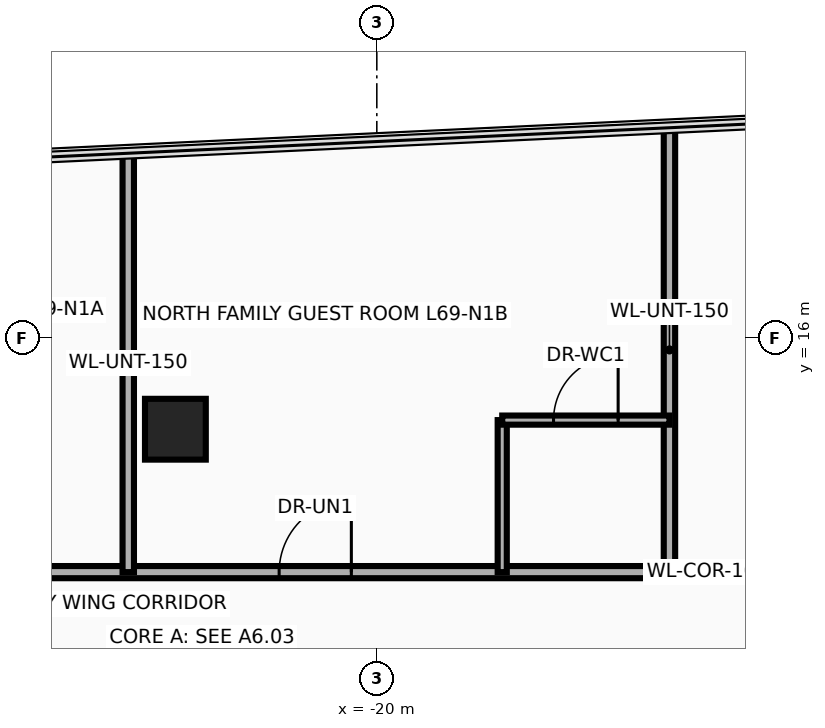
"""IFC4 building model, lengths in metres.
Left out: names, types, materials, properties, quantities, classifications, styles, units other than length and angle.
Written with IfcOpenShell. Run it as: python <this file> out.ifc"""

import sys

from ifc_helpers import new_model, si_unit, direction, frame, frame_2d, origin, origin_2d, place, context, subcontext, project, spatial, rectangle, extrude, source, transform, mapped, element, fill, save


model = new_model("IFC4")
c1 = context("Model", 3, precision=1e-05, world=origin(), true_north=direction((0.0, 1.0)))
c2 = subcontext(c1, "Body", "Model", "MODEL_VIEW")
j1 = project(units=[si_unit("LENGTHUNIT", "METRE"), si_unit("PLANEANGLEUNIT", "RADIAN")], contexts=[c1])
p1 = place(None, origin())
s1 = spatial("IfcSite", under=j1, at=p1, CompositionType="ELEMENT")
p2 = place(p1, origin())
s2 = spatial("IfcBuilding", under=s1, at=p2, CompositionType="ELEMENT")
p3 = place(p2, frame((0.0, 0.0, 266.0)))
s3 = spatial("IfcBuildingStorey", under=s2, at=p3, CompositionType="ELEMENT", Elevation=266.0)
m1 = source(origin(), c2, "Body", "SweptSolid", [
    extrude(rectangle(XDim=0.8, YDim=0.8, at=origin_2d()), origin(), (0.0, 0.0, 1.0), 3.5),
])
p4 = place(p3, frame((-22.65, 14.8, 0.0), z_axis=(0.0, 0.0, 1.0), x_axis=(1.0, 0.0, 0.0)))
e1 = element("IfcColumn", 1, at=p4, inside=s3, PredefinedType="COLUMN", context=c2, shape_type="MappedRepresentation", body=[
    mapped(m1, transform((0.0, 0.0, 0.0), x_axis=(1.0, 0.0, 0.0), y_axis=(0.0, 1.0, 0.0), z_axis=(0.0, 0.0, 1.0), scale=1.0)),
])
p5 = place(p3, frame((-30.39, 12.92, 0.0), z_axis=(0.0, 0.0, 1.0), x_axis=(1.0, 0.0, 0.0)))
e2 = element("IfcWall", 2, at=p5, inside=s3, PredefinedType="PARTITIONING", context=c2, shape_type="SweptSolid", body=[
    extrude(rectangle(XDim=29.48, YDim=0.16, at=frame_2d((14.74, 0.0))), origin(), (0.0, 0.0, 1.0), 2.634),
])
p6 = place(p5, frame((3.085, 0.0, 0.0)))
e3 = element("IfcOpeningElement", 3, at=p6, cuts=e2, PredefinedType="OPENING", context=c2, shape_type="SweptSolid", body=[
    extrude(rectangle(XDim=0.95, YDim=2.15, at=frame_2d((0.475, 1.075))), frame((0.0, 0.095, 0.0), z_axis=(0.0, -1.0, 0.0), x_axis=(1.0, 0.0, 0.0)), (0.0, 0.0, 1.0), 0.19),
])
p7 = place(p5, frame((9.105, 0.0, 0.0)))
e4 = element("IfcOpeningElement", 4, at=p7, cuts=e2, PredefinedType="OPENING", context=c2, shape_type="SweptSolid", body=[
    extrude(rectangle(XDim=0.95, YDim=2.15, at=frame_2d((0.475, 1.075))), frame((0.0, 0.095, 0.0), z_axis=(0.0, -1.0, 0.0), x_axis=(1.0, 0.0, 0.0)), (0.0, 0.0, 1.0), 0.19),
])
p8 = place(p5, frame((17.27, 0.0, 0.0)))
e5 = element("IfcOpeningElement", 5, at=p8, cuts=e2, PredefinedType="OPENING", context=c2, shape_type="SweptSolid", body=[
    extrude(rectangle(XDim=0.95, YDim=2.15, at=frame_2d((0.475, 1.075))), frame((0.0, 0.095, 0.0), z_axis=(0.0, -1.0, 0.0), x_axis=(1.0, 0.0, 0.0)), (0.0, 0.0, 1.0), 0.19),
])
p9 = place(p3, frame((-16.15, 12.92, 0.0), z_axis=(0.0, 0.0, 1.0), x_axis=(0.0, 1.0, 0.0)))
e6 = element("IfcWall", 6, at=p9, inside=s3, PredefinedType="PARTITIONING", context=c2, shape_type="SweptSolid", body=[
    extrude(rectangle(XDim=5.846, YDim=0.15, at=frame_2d((2.923, 0.0))), origin(), (0.0, 0.0, 1.0), 2.623),
])
p10 = place(p3, frame((-23.27, 12.92, 0.0), z_axis=(0.0, 0.0, 1.0), x_axis=(0.0, 1.0, 0.0)))
e7 = element("IfcWall", 7, at=p10, inside=s3, PredefinedType="PARTITIONING", context=c2, shape_type="SweptSolid", body=[
    extrude(rectangle(XDim=5.511, YDim=0.15, at=frame_2d((2.755, 0.0))), origin(), (0.0, 0.0, 1.0), 2.623),
])
p11 = place(p3, frame((-18.35, 12.92, 0.0), z_axis=(0.0, 0.0, 1.0), x_axis=(0.0, 1.0, 0.0)))
e8 = element("IfcWall", 8, at=p11, inside=s3, PredefinedType="PARTITIONING", context=c2, shape_type="SweptSolid", body=[
    extrude(rectangle(XDim=2.0, YDim=0.12, at=frame_2d((1.0, 0.0))), origin(), (0.0, 0.0, 1.0), 2.623),
])
p12 = place(p3, frame((-18.35, 14.92, 0.0), z_axis=(0.0, 0.0, 1.0), x_axis=(1.0, 0.0, 0.0)))
e9 = element("IfcWall", 9, at=p12, inside=s3, PredefinedType="PARTITIONING", context=c2, shape_type="SweptSolid", body=[
    extrude(rectangle(XDim=2.2, YDim=0.12, at=frame_2d((1.1, 0.0))), origin(), (0.0, 0.0, 1.0), 2.623),
])
p13 = place(p12, frame((0.675, 0.0, 0.0)))
e10 = element("IfcOpeningElement", 10, at=p13, cuts=e9, PredefinedType="OPENING", context=c2, shape_type="SweptSolid", body=[
    extrude(rectangle(XDim=0.85, YDim=2.1, at=frame_2d((0.425, 1.05))), frame((0.0, 0.075, 0.0), z_axis=(0.0, -1.0, 0.0), x_axis=(1.0, 0.0, 0.0)), (0.0, 0.0, 1.0), 0.15),
])
p14 = place(p7, origin())
e11 = element("IfcDoor", 11, at=p14, inside=s3, OperationType="SINGLE_SWING_RIGHT", PredefinedType="DOOR", context=c2, shape_type="SweptSolid", body=[
    extrude(rectangle(XDim=0.95, YDim=2.15, at=frame_2d((0.475, 1.075))), frame((0.0, 0.025, 0.0), z_axis=(0.0, -1.0, 0.0), x_axis=(1.0, 0.0, 0.0)), (0.0, 0.0, 1.0), 0.05),
])
fill(e4, e11)
p15 = place(p13, origin())
e12 = element("IfcDoor", 12, at=p15, inside=s3, OperationType="SINGLE_SWING_LEFT", PredefinedType="DOOR", context=c2, shape_type="SweptSolid", body=[
    extrude(rectangle(XDim=0.85, YDim=2.1, at=frame_2d((0.425, 1.05))), frame((0.0, 0.025, 0.0), z_axis=(0.0, -1.0, 0.0), x_axis=(1.0, 0.0, 0.0)), (0.0, 0.0, 1.0), 0.05),
])
fill(e10, e12)
save(model, sys.argv[1])
